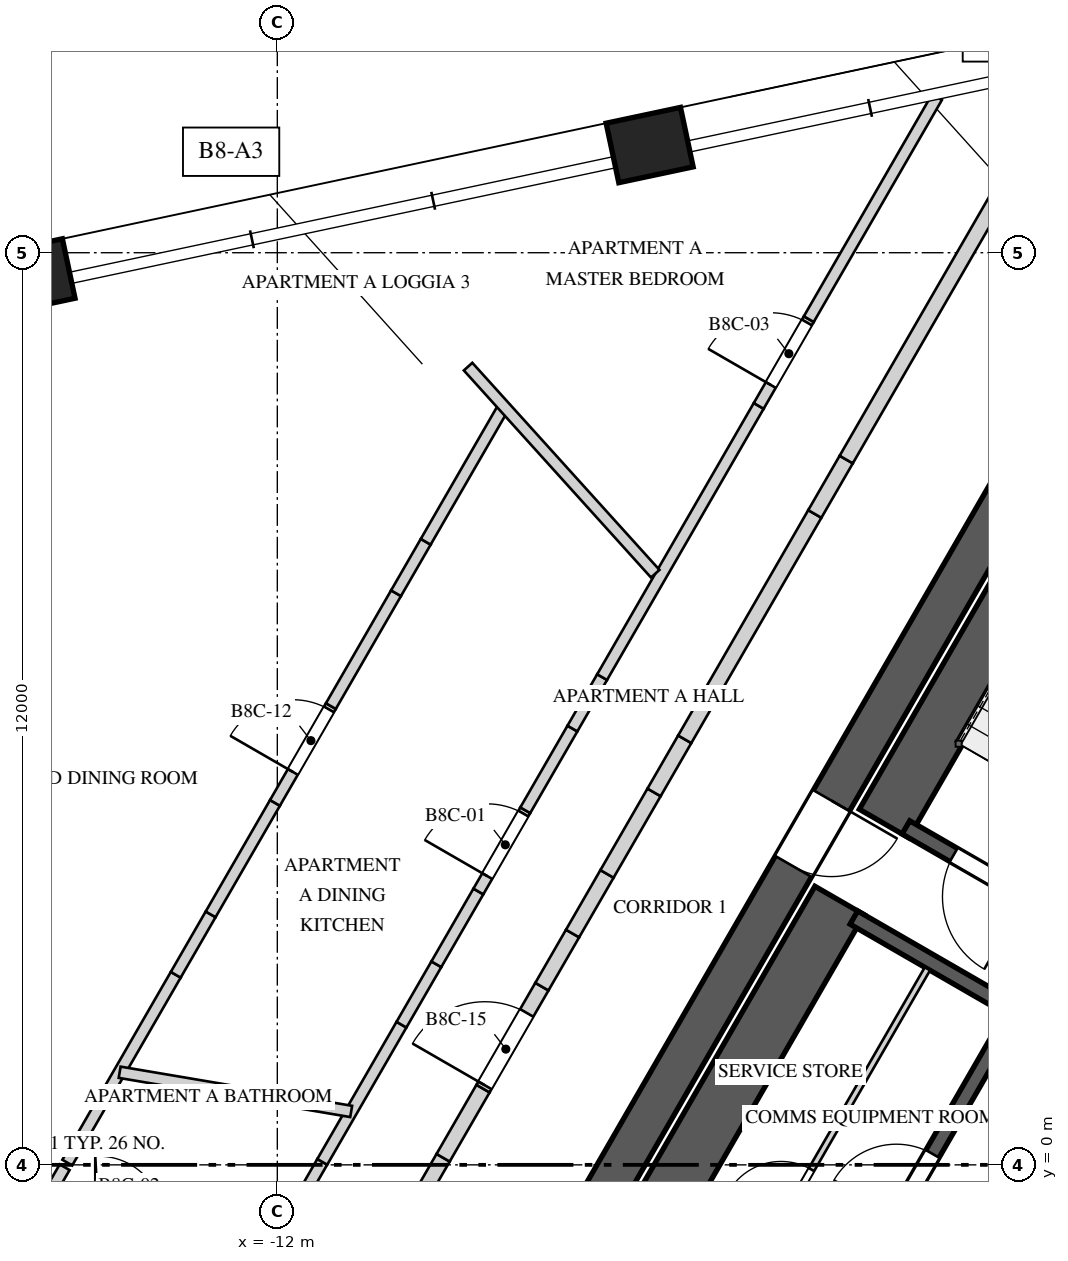
"""IFC4 building model, lengths in metres.
Left out: names, types, materials, properties, quantities, classifications, styles, units other than length and angle.
Written with IfcOpenShell. Run it as: python <this file> out.ifc"""

import sys

from ifc_helpers import new_model, si_unit, direction, frame, frame_2d, origin, origin_2d, place, context, subcontext, project, spatial, polyline, rectangle, outline, extrude, element, fill, save


model = new_model("IFC4")
c1 = context("Model", 3, precision=1e-05, world=origin(), true_north=direction((0.0, 1.0)))
c2 = subcontext(c1, "Body", "Model", "MODEL_VIEW")
j1 = project(units=[si_unit("LENGTHUNIT", "METRE"), si_unit("PLANEANGLEUNIT", "RADIAN")], contexts=[c1])
p1 = place(None, origin())
s1 = spatial("IfcSite", under=j1, at=p1, CompositionType="ELEMENT")
p2 = place(p1, origin())
s2 = spatial("IfcBuilding", under=s1, at=p2, CompositionType="ELEMENT")
p3 = place(p2, frame((0.0, 0.0, 348.4)))
s3 = spatial("IfcBuildingStorey", under=s2, at=p3, CompositionType="ELEMENT", Elevation=348.4)
p4 = place(p3, frame((-1.285, 10.725, 0.0), z_axis=(0.0, 0.0, 1.0), x_axis=(-0.499994590896, -0.86602852671, 0.0)))
e1 = element("IfcWall", 1, at=p4, inside=s3, PredefinedType="SHEAR", context=c2, shape_type="SweptSolid", body=[
    extrude(rectangle(XDim=17.292, YDim=0.55, at=frame_2d((8.646, 0.0))), origin(), (0.0, 0.0, 1.0), 4.0),
])
p5 = place(p4, frame((6.851, 0.0, 0.0)))
e2 = element("IfcOpeningElement", 2, at=p5, cuts=e1, PredefinedType="OPENING", context=c2, shape_type="SweptSolid", body=[
    extrude(rectangle(XDim=1.0, YDim=2.4, at=frame_2d((0.5, 1.2))), frame((0.0, 0.285, 0.0), z_axis=(0.0, -1.0, 0.0), x_axis=(1.0, 0.0, 0.0)), (0.0, 0.0, 1.0), 0.57),
])
p6 = place(p4, frame((15.089, 0.0, 0.0)))
e3 = element("IfcOpeningElement", 3, at=p6, cuts=e1, PredefinedType="OPENING", context=c2, shape_type="SweptSolid", body=[
    extrude(rectangle(XDim=0.8, YDim=2.1, at=frame_2d((0.4, 1.05))), frame((0.0, 0.285, 0.0), z_axis=(0.0, -1.0, 0.0), x_axis=(1.0, 0.0, 0.0)), (0.0, 0.0, 1.0), 0.57),
])
for number, where, z_axis, x_axis in (
    (4, (-7.102, 13.417, 0.0), (0.0, 0.0, 1.0), (-0.978, -0.208, 0.0)),
    (5, (-15.234, 11.688, 0.0), (0.0, 0.0, 1.0), (-0.978, -0.208, 0.0)),
):
    element("IfcColumn", number, at=place(p3, frame(where, z_axis=z_axis, x_axis=x_axis)), inside=s3, PredefinedType="COLUMN", context=c2, shape_type="SweptSolid", body=[
        extrude(rectangle(XDim=1.0, YDim=0.8, at=origin_2d()), origin(), (0.0, 0.0, 1.0), 4.0),
    ])
p7 = place(p3, frame((-0.918, 9.86, 0.0), z_axis=(0.0, 0.0, 1.0), x_axis=(-0.500026960575, -0.86600983753, 0.0)))
e6 = element("IfcWall", 6, at=p7, inside=s3, PredefinedType="SOLIDWALL", context=c2, shape_type="SweptSolid", body=[
    extrude(rectangle(XDim=6.2, YDim=0.75, at=frame_2d((3.1, 0.0))), origin(), (0.0, 0.0, 1.0), 3.65),
])
p8 = place(p3, frame((-1.521, 3.165, 0.0), z_axis=(0.0, 0.0, 1.0), x_axis=(-0.866030925526, 0.499990435942, 0.0)))
e7 = element("IfcWall", 7, at=p8, inside=s3, PredefinedType="SOLIDWALL", context=c2, shape_type="SweptSolid", body=[
    extrude(rectangle(XDim=2.55, YDim=0.2, at=frame_2d((1.275, 0.0))), origin(), (0.0, 0.0, 1.0), 3.65),
])
p9 = place(p8, frame((0.725, 0.0, 0.0)))
e8 = element("IfcOpeningElement", 8, at=p9, cuts=e7, PredefinedType="OPENING", context=c2, shape_type="SweptSolid", body=[
    extrude(rectangle(XDim=1.1, YDim=2.4, at=frame_2d((0.55, 1.2))), frame((0.0, 0.11, 0.0), z_axis=(0.0, -1.0, 0.0), x_axis=(1.0, 0.0, 0.0)), (0.0, 0.0, 1.0), 0.22),
])
p10 = place(p3, frame((-4.993, -2.648, 0.0), z_axis=(0.0, 0.0, 1.0), x_axis=(0.499996545922, 0.866027397988, 0.0)))
e9 = element("IfcWall", 9, at=p10, inside=s3, PredefinedType="SOLIDWALL", context=c2, shape_type="SweptSolid", body=[
    extrude(rectangle(XDim=5.5, YDim=0.2, at=frame_2d((2.75, 0.0))), origin(), (0.0, 0.0, 1.0), 3.65),
])
p11 = place(p10, frame((2.275, 0.0, 0.0)))
e10 = element("IfcOpeningElement", 10, at=p11, cuts=e9, PredefinedType="OPENING", context=c2, shape_type="SweptSolid", body=[
    extrude(rectangle(XDim=0.95, YDim=2.4, at=frame_2d((0.475, 1.2))), frame((0.0, 0.11, 0.0), z_axis=(0.0, -1.0, 0.0), x_axis=(1.0, 0.0, 0.0)), (0.0, 0.0, 1.0), 0.22),
])
p12 = place(p3, frame((-4.603, 3.477, 0.0), z_axis=(0.0, 0.0, 1.0), x_axis=(-0.500015767406, -0.866016300277, 0.0)))
e11 = element("IfcWall", 11, at=p12, inside=s3, PredefinedType="SOLIDWALL", context=c2, shape_type="SweptSolid", body=[
    extrude(rectangle(XDim=5.5, YDim=0.75, at=frame_2d((2.75, 0.0))), origin(), (0.0, 0.0, 1.0), 3.65),
])
p13 = place(p3, frame((-2.38, 2.078, 0.0), z_axis=(0.0, 0.0, 1.0), x_axis=(-0.866061024631, 0.499938297808, 0.0)))
e12 = element("IfcWall", 12, at=p13, inside=s3, PredefinedType="SOLIDWALL", context=c2, shape_type="SweptSolid", body=[
    extrude(rectangle(XDim=2.35, YDim=0.2, at=frame_2d((1.175, 0.0))), origin(), (0.0, 0.0, 1.0), 3.65),
])
p14 = place(p3, frame((-5.997, -1.838, 0.0), z_axis=(0.0, 0.0, 1.0), x_axis=(0.500005610874, 0.86602216432, 0.0)))
e13 = element("IfcWall", 13, at=p14, inside=s3, PredefinedType="PARTITIONING", context=c2, shape_type="SweptSolid", body=[
    extrude(rectangle(XDim=5.1, YDim=0.08, at=frame_2d((2.55, 0.0))), origin(), (0.0, 0.0, 1.0), 3.65),
])
p15 = place(p14, frame((1.25, 0.0, 0.0)))
e14 = element("IfcOpeningElement", 14, at=p15, cuts=e13, PredefinedType="OPENING", context=c2, shape_type="SweptSolid", body=[
    extrude(rectangle(XDim=0.8, YDim=2.1, at=frame_2d((0.4, 1.05))), frame((0.0, 0.05, 0.0), z_axis=(0.0, -1.0, 0.0), x_axis=(1.0, 0.0, 0.0)), (0.0, 0.0, 1.0), 0.1),
])
p16 = place(p3, frame((-15.145, -0.631, 0.0), z_axis=(0.0, 0.0, 1.0), x_axis=(0.499966449638, 0.866044773228, 0.0)))
e15 = element("IfcWall", 15, at=p16, inside=s3, PredefinedType="PARTITIONING", context=c2, shape_type="SweptSolid", body=[
    extrude(rectangle(XDim=0.693, YDim=0.15, at=frame_2d((0.346, 0.0))), origin(), (0.0, 0.0, 1.0), 2.95),
])
p17 = place(p3, frame((-14.763, 0.03, 0.0), z_axis=(0.0, 0.0, 1.0), x_axis=(0.500003887042, 0.866023159588, 0.0)))
e16 = element("IfcWall", 16, at=p17, inside=s3, PredefinedType="PARTITIONING", context=c2, shape_type="SweptSolid", body=[
    extrude(rectangle(XDim=2.854, YDim=0.15, at=frame_2d((1.427, 0.0))), origin(), (0.0, 0.0, 1.0), 3.65),
])
p18 = place(p3, frame((-13.336, 2.501, 0.0), z_axis=(0.0, 0.0, 1.0), x_axis=(0.500144624036, 0.865941888956, 0.0)))
e17 = element("IfcWall", 17, at=p18, inside=s3, PredefinedType="PARTITIONING", context=c2, shape_type="SweptSolid", body=[
    extrude(rectangle(XDim=0.918, YDim=0.15, at=frame_2d((0.459, 0.0))), origin(), (0.0, 0.0, 1.0), 2.55),
])
p19 = place(p3, frame((-12.877, 3.295, 0.0), z_axis=(0.0, 0.0, 1.0), x_axis=(0.499876388284, 0.86609675928, 0.0)))
e18 = element("IfcWall", 18, at=p19, inside=s3, PredefinedType="PARTITIONING", context=c2, shape_type="SweptSolid", body=[
    extrude(rectangle(XDim=1.693, YDim=0.15, at=frame_2d((0.847, 0.0))), origin(), (0.0, 0.0, 1.0), 3.65),
])
p20 = place(p3, frame((-12.031, 4.762, 0.0), z_axis=(0.0, 0.0, 1.0), x_axis=(0.50006736263, 0.865986508459, 0.0)))
e19 = element("IfcWall", 19, at=p20, inside=s3, PredefinedType="PARTITIONING", context=c2, shape_type="SweptSolid", body=[
    extrude(outline(polyline([(0.0, 0.0), (1.47, 0.0), (1.471, 3.65), (0.881, 3.65), (0.881, 2.55), (0.0, 2.55), (0.0, 0.0)])), frame((0.0, 0.075, 0.0), z_axis=(0.0, -1.0, 0.0), x_axis=(1.0, 0.0, 0.0)), (0.0, 0.0, 1.0), 0.15),
])
p21 = place(p20, frame((0.471, 0.0, 0.0)))
e20 = element("IfcOpeningElement", 20, at=p21, cuts=e19, PredefinedType="OPENING", context=c2, shape_type="SweptSolid", body=[
    extrude(rectangle(XDim=0.95, YDim=2.4, at=frame_2d((0.475, 1.2))), frame((0.0, 0.085, 0.0), z_axis=(0.0, -1.0, 0.0), x_axis=(1.0, 0.0, 0.0)), (0.0, 0.0, 1.0), 0.17),
])
p22 = place(p3, frame((-11.296, 6.035, 0.0), z_axis=(0.0, 0.0, 1.0), x_axis=(0.500059337743, 0.865991142412, 0.0)))
e21 = element("IfcWall", 21, at=p22, inside=s3, PredefinedType="PARTITIONING", context=c2, shape_type="SweptSolid", body=[
    extrude(rectangle(XDim=1.715, YDim=0.15, at=frame_2d((0.857, 0.0))), origin(), (0.0, 0.0, 1.0), 3.65),
])
p23 = place(p3, frame((-10.438, 7.52, 0.0), z_axis=(0.0, 0.0, 1.0), x_axis=(0.500001804394, 0.866024362014, 0.0)))
e22 = element("IfcWall", 22, at=p23, inside=s3, PredefinedType="PARTITIONING", context=c2, shape_type="SweptSolid", body=[
    extrude(rectangle(XDim=0.782, YDim=0.15, at=frame_2d((0.391, 0.0))), origin(), (0.0, 0.0, 1.0), 2.75),
])
p24 = place(p3, frame((-10.047, 8.197, 0.0), z_axis=(0.0, 0.0, 1.0), x_axis=(0.499972721762, 0.86604115231, 0.0)))
e23 = element("IfcWall", 23, at=p24, inside=s3, PredefinedType="PARTITIONING", context=c2, shape_type="SweptSolid", body=[
    extrude(rectangle(XDim=2.055, YDim=0.15, at=frame_2d((1.027, 0.0))), origin(), (0.0, 0.0, 1.0), 3.65),
])
p25 = place(p3, frame((-11.78, -0.603, 0.0), z_axis=(0.0, 0.0, 1.0), x_axis=(0.49999788721, 0.866026623601, 0.0)))
e24 = element("IfcWall", 24, at=p25, inside=s3, PredefinedType="PARTITIONING", context=c2, shape_type="SweptSolid", body=[
    extrude(rectangle(XDim=0.742, YDim=0.15, at=frame_2d((0.371, 0.0))), origin(), (0.0, 0.0, 1.0), 2.95),
])
p26 = place(p3, frame((-11.409, 0.039, 0.0), z_axis=(0.0, 0.0, 1.0), x_axis=(0.499969202016, 0.866043184279, 0.0)))
e25 = element("IfcWall", 25, at=p26, inside=s3, PredefinedType="PARTITIONING", context=c2, shape_type="SweptSolid", body=[
    extrude(rectangle(XDim=2.084, YDim=0.15, at=frame_2d((1.042, 0.0))), origin(), (0.0, 0.0, 1.0), 3.65),
])
p27 = place(p3, frame((-10.367, 1.844, 0.0), z_axis=(0.0, 0.0, 1.0), x_axis=(0.499945096919, 0.866057099772, 0.0)))
e26 = element("IfcWall", 26, at=p27, inside=s3, PredefinedType="PARTITIONING", context=c2, shape_type="SweptSolid", body=[
    extrude(rectangle(XDim=0.917, YDim=0.15, at=frame_2d((0.459, 0.0))), origin(), (0.0, 0.0, 1.0), 2.55),
])
p28 = place(p3, frame((-9.908, 2.639, 0.0), z_axis=(0.0, 0.0, 1.0), x_axis=(0.500009088543, 0.866020156448, 0.0)))
e27 = element("IfcWall", 27, at=p28, inside=s3, PredefinedType="PARTITIONING", context=c2, shape_type="SweptSolid", body=[
    extrude(rectangle(XDim=1.106, YDim=0.15, at=frame_2d((0.553, 0.0))), origin(), (0.0, 0.0, 1.0), 3.65),
])
p29 = place(p3, frame((-9.355, 3.597, 0.0), z_axis=(0.0, 0.0, 1.0), x_axis=(0.499990780478, 0.866030726613, 0.0)))
e28 = element("IfcWall", 28, at=p29, inside=s3, PredefinedType="PARTITIONING", context=c2, shape_type="SweptSolid", body=[
    extrude(outline(polyline([(0.0, 0.0), (1.234, 0.0), (1.234, 3.65), (0.881, 3.65), (0.881, 2.55), (0.0, 2.55), (0.0, 0.0)])), frame((0.0, 0.075, 0.0), z_axis=(0.0, -1.0, 0.0), x_axis=(1.0, 0.0, 0.0)), (0.0, 0.0, 1.0), 0.15),
])
p30 = place(p29, frame((0.234, 0.0, 0.0)))
e29 = element("IfcOpeningElement", 29, at=p30, cuts=e28, PredefinedType="OPENING", context=c2, shape_type="SweptSolid", body=[
    extrude(rectangle(XDim=0.95, YDim=2.4, at=frame_2d((0.475, 1.2))), frame((0.0, 0.085, 0.0), z_axis=(0.0, -1.0, 0.0), x_axis=(1.0, 0.0, 0.0)), (0.0, 0.0, 1.0), 0.17),
])
p31 = place(p3, frame((-8.738, 4.665, 0.0), z_axis=(0.0, 0.0, 1.0), x_axis=(0.500012022864, 0.866018462269, 0.0)))
e30 = element("IfcWall", 30, at=p31, inside=s3, PredefinedType="PARTITIONING", context=c2, shape_type="SweptSolid", body=[
    extrude(rectangle(XDim=1.241, YDim=0.15, at=frame_2d((0.62, 0.0))), origin(), (0.0, 0.0, 1.0), 3.65),
])
p32 = place(p3, frame((-8.118, 5.74, 0.0), z_axis=(0.0, 0.0, 1.0), x_axis=(0.500001804394, 0.866024362014, 0.0)))
e31 = element("IfcWall", 31, at=p32, inside=s3, PredefinedType="PARTITIONING", context=c2, shape_type="SweptSolid", body=[
    extrude(rectangle(XDim=0.782, YDim=0.15, at=frame_2d((0.391, 0.0))), origin(), (0.0, 0.0, 1.0), 2.75),
])
p33 = place(p3, frame((-7.727, 6.417, 0.0), z_axis=(0.0, 0.0, 1.0), x_axis=(0.50002680699, 0.866009926209, 0.0)))
e32 = element("IfcWall", 32, at=p33, inside=s3, PredefinedType="PARTITIONING", context=c2, shape_type="SweptSolid", body=[
    extrude(rectangle(XDim=4.12, YDim=0.15, at=frame_2d((2.06, 0.0))), origin(), (0.0, 0.0, 1.0), 3.65),
])
p34 = place(p3, frame((-5.667, 9.985, 0.0), z_axis=(0.0, 0.0, 1.0), x_axis=(0.499904166098, 0.866080726444, 0.0)))
e33 = element("IfcWall", 33, at=p34, inside=s3, PredefinedType="PARTITIONING", context=c2, shape_type="SweptSolid", body=[
    extrude(outline(polyline([(0.0, 0.0), (1.318, 0.0), (1.318, 3.65), (0.797, 3.65), (0.797, 2.95), (0.0, 2.95), (0.0, 0.0)])), frame((0.0, 0.075, 0.0), z_axis=(0.0, -1.0, 0.0), x_axis=(1.0, 0.0, 0.0)), (0.0, 0.0, 1.0), 0.15),
])
p35 = place(p34, frame((0.318, 0.0, 0.0)))
e34 = element("IfcOpeningElement", 34, at=p35, cuts=e33, PredefinedType="OPENING", context=c2, shape_type="SweptSolid", body=[
    extrude(rectangle(XDim=0.95, YDim=2.4, at=frame_2d((0.475, 1.2))), frame((0.0, 0.085, 0.0), z_axis=(0.0, -1.0, 0.0), x_axis=(1.0, 0.0, 0.0)), (0.0, 0.0, 1.0), 0.17),
])
p36 = place(p3, frame((-5.008, 11.126, 0.0), z_axis=(0.0, 0.0, 1.0), x_axis=(0.499994068514, 0.866028828302, 0.0)))
e35 = element("IfcWall", 35, at=p36, inside=s3, PredefinedType="PARTITIONING", context=c2, shape_type="SweptSolid", body=[
    extrude(rectangle(XDim=3.372, YDim=0.15, at=frame_2d((1.686, 0.0))), origin(), (0.0, 0.0, 1.0), 3.65),
])
p37 = place(p3, frame((-11.028, 0.703, 0.0), z_axis=(0.0, 0.0, 1.0), x_axis=(-0.985959074205, 0.166987137207, 0.0)))
e36 = element("IfcWall", 36, at=p37, inside=s3, PredefinedType="PARTITIONING", context=c2, shape_type="SweptSolid", body=[
    extrude(rectangle(XDim=3.089, YDim=0.15, at=frame_2d((1.545, 0.0))), origin(), (0.0, 0.0, 1.0), 3.65),
])
p38 = place(p3, frame((-9.49, 10.502, 0.0), z_axis=(0.0, 0.0, 1.0), x_axis=(0.670469300735, -0.741937272801, 0.0)))
e37 = element("IfcWall", 37, at=p38, inside=s3, PredefinedType="PARTITIONING", context=c2, shape_type="SweptSolid", body=[
    extrude(rectangle(XDim=3.672, YDim=0.15, at=frame_2d((1.836, 0.0))), origin(), (0.0, 0.0, 1.0), 3.65),
])
p39 = place(p3, frame((-10.229, -0.617, 0.0), z_axis=(0.0, 0.0, 1.0), x_axis=(0.5001686003, 0.865928040471, 0.0)))
e38 = element("IfcWall", 38, at=p39, inside=s3, PredefinedType="SOLIDWALL", context=c2, shape_type="SweptSolid", body=[
    extrude(rectangle(XDim=0.821, YDim=0.2, at=frame_2d((0.411, 0.0))), origin(), (0.0, 0.0, 1.0), 2.95),
])
p40 = place(p3, frame((-9.819, 0.094, 0.0), z_axis=(0.0, 0.0, 1.0), x_axis=(0.499890179513, 0.866088799389, 0.0)))
e39 = element("IfcWall", 39, at=p40, inside=s3, PredefinedType="SOLIDWALL", context=c2, shape_type="SweptSolid", body=[
    extrude(rectangle(XDim=1.05, YDim=0.2, at=frame_2d((0.525, 0.0))), origin(), (0.0, 0.0, 1.0), 3.65),
])
p41 = place(p3, frame((-9.294, 1.003, 0.0), z_axis=(0.0, 0.0, 1.0), x_axis=(0.500054401891, 0.86599399256, 0.0)))
e40 = element("IfcWall", 40, at=p41, inside=s3, PredefinedType="SOLIDWALL", context=c2, shape_type="SweptSolid", body=[
    extrude(outline(polyline([(0.0, 0.0), (1.549, 0.0), (1.549, 2.55), (0.605, 2.55), (0.605, 3.65), (0.0, 3.65), (0.0, 0.0)])), frame((0.0, 0.1, 0.0), z_axis=(0.0, -1.0, 0.0), x_axis=(1.0, 0.0, 0.0)), (0.0, 0.0, 1.0), 0.2),
])
p42 = place(p41, frame((0.05, 0.0, 0.0)))
e41 = element("IfcOpeningElement", 41, at=p42, cuts=e40, PredefinedType="OPENING", context=c2, shape_type="SweptSolid", body=[
    extrude(rectangle(XDim=1.1, YDim=2.4, at=frame_2d((0.55, 1.2))), frame((0.0, 0.11, 0.0), z_axis=(0.0, -1.0, 0.0), x_axis=(1.0, 0.0, 0.0)), (0.0, 0.0, 1.0), 0.22),
])
p43 = place(p3, frame((-8.519, 2.344, 0.0), z_axis=(0.0, 0.0, 1.0), x_axis=(0.499914554297, 0.866074730264, 0.0)))
e42 = element("IfcWall", 42, at=p43, inside=s3, PredefinedType="SOLIDWALL", context=c2, shape_type="SweptSolid", body=[
    extrude(rectangle(XDim=0.807, YDim=0.2, at=frame_2d((0.403, 0.0))), origin(), (0.0, 0.0, 1.0), 3.65),
])
p44 = place(p3, frame((-8.116, 3.043, 0.0), z_axis=(0.0, 0.0, 1.0), x_axis=(0.499994660107, 0.866028486751, 0.0)))
e43 = element("IfcWall", 43, at=p44, inside=s3, PredefinedType="SOLIDWALL", context=c2, shape_type="SweptSolid", body=[
    extrude(rectangle(XDim=0.906, YDim=0.2, at=frame_2d((0.453, 0.0))), origin(), (0.0, 0.0, 1.0), 2.55),
])
p45 = place(p3, frame((-7.663, 3.828, 0.0), z_axis=(0.0, 0.0, 1.0), x_axis=(0.499955681623, 0.866050989499, 0.0)))
e44 = element("IfcWall", 44, at=p45, inside=s3, PredefinedType="SOLIDWALL", context=c2, shape_type="SweptSolid", body=[
    extrude(rectangle(XDim=1.238, YDim=0.2, at=frame_2d((0.619, 0.0))), origin(), (0.0, 0.0, 1.0), 3.65),
])
p46 = place(p3, frame((-7.044, 4.9, 0.0), z_axis=(0.0, 0.0, 1.0), x_axis=(0.500141487433, 0.865943700565, 0.0)))
e45 = element("IfcWall", 45, at=p46, inside=s3, PredefinedType="SOLIDWALL", context=c2, shape_type="SweptSolid", body=[
    extrude(rectangle(XDim=0.807, YDim=0.2, at=frame_2d((0.403, 0.0))), origin(), (0.0, 0.0, 1.0), 2.75),
])
p47 = place(p3, frame((-6.64, 5.599, 0.0), z_axis=(0.0, 0.0, 1.0), x_axis=(0.499989998285, 0.8660311782, 0.0)))
e46 = element("IfcWall", 46, at=p47, inside=s3, PredefinedType="SOLIDWALL", context=c2, shape_type="SweptSolid", body=[
    extrude(rectangle(XDim=3.423, YDim=0.2, at=frame_2d((1.711, 0.0))), origin(), (0.0, 0.0, 1.0), 3.65),
])
p48 = place(p3, frame((-4.929, 8.563, 0.0), z_axis=(0.0, 0.0, 1.0), x_axis=(0.500046299512, 0.865998671098, 0.0)))
e47 = element("IfcWall", 47, at=p48, inside=s3, PredefinedType="SOLIDWALL", context=c2, shape_type="SweptSolid", body=[
    extrude(rectangle(XDim=0.827, YDim=0.2, at=frame_2d((0.413, 0.0))), origin(), (0.0, 0.0, 1.0), 2.95),
])
p49 = place(p3, frame((-4.515, 9.279, 0.0), z_axis=(0.0, 0.0, 1.0), x_axis=(0.499975428181, 0.866039589866, 0.0)))
e48 = element("IfcWall", 48, at=p49, inside=s3, PredefinedType="SOLIDWALL", context=c2, shape_type="SweptSolid", body=[
    extrude(rectangle(XDim=4.066, YDim=0.2, at=frame_2d((2.033, 0.0))), origin(), (0.0, 0.0, 1.0), 3.65),
])
p50 = place(p9, origin())
e49 = element("IfcDoor", 49, at=p50, inside=s3, OperationType="SINGLE_SWING_RIGHT", PredefinedType="DOOR", context=c2, shape_type="SweptSolid", body=[
    extrude(rectangle(XDim=1.1, YDim=2.4, at=frame_2d((0.55, 1.2))), frame((0.0, 0.025, 0.0), z_axis=(0.0, -1.0, 0.0), x_axis=(1.0, 0.0, 0.0)), (0.0, 0.0, 1.0), 0.05),
])
fill(e8, e49)
p51 = place(p11, origin())
e50 = element("IfcDoor", 50, at=p51, inside=s3, OperationType="SINGLE_SWING_LEFT", PredefinedType="DOOR", context=c2, shape_type="SweptSolid", body=[
    extrude(rectangle(XDim=0.95, YDim=2.4, at=frame_2d((0.475, 1.2))), frame((0.0, 0.025, 0.0), z_axis=(0.0, -1.0, 0.0), x_axis=(1.0, 0.0, 0.0)), (0.0, 0.0, 1.0), 0.05),
])
fill(e10, e50)
p52 = place(p15, origin())
e51 = element("IfcDoor", 51, at=p52, inside=s3, OperationType="SINGLE_SWING_RIGHT", PredefinedType="DOOR", context=c2, shape_type="SweptSolid", body=[
    extrude(rectangle(XDim=0.8, YDim=2.1, at=frame_2d((0.4, 1.05))), frame((0.0, 0.025, 0.0), z_axis=(0.0, -1.0, 0.0), x_axis=(1.0, 0.0, 0.0)), (0.0, 0.0, 1.0), 0.05),
])
fill(e14, e51)
p53 = place(p5, origin())
e52 = element("IfcDoor", 52, at=p53, inside=s3, OperationType="SINGLE_SWING_RIGHT", PredefinedType="DOOR", context=c2, shape_type="SweptSolid", body=[
    extrude(rectangle(XDim=1.0, YDim=2.4, at=frame_2d((0.5, 1.2))), frame((0.0, 0.025, 0.0), z_axis=(0.0, -1.0, 0.0), x_axis=(1.0, 0.0, 0.0)), (0.0, 0.0, 1.0), 0.05),
])
fill(e2, e52)
p54 = place(p30, origin())
e53 = element("IfcDoor", 53, at=p54, inside=s3, OperationType="SINGLE_SWING_LEFT", PredefinedType="DOOR", context=c2, shape_type="SweptSolid", body=[
    extrude(rectangle(XDim=0.95, YDim=2.4, at=frame_2d((0.475, 1.2))), frame((0.0, 0.025, 0.0), z_axis=(0.0, -1.0, 0.0), x_axis=(1.0, 0.0, 0.0)), (0.0, 0.0, 1.0), 0.05),
])
fill(e29, e53)
p55 = place(p35, origin())
e54 = element("IfcDoor", 54, at=p55, inside=s3, OperationType="SINGLE_SWING_LEFT", PredefinedType="DOOR", context=c2, shape_type="SweptSolid", body=[
    extrude(rectangle(XDim=0.95, YDim=2.4, at=frame_2d((0.475, 1.2))), frame((0.0, 0.025, 0.0), z_axis=(0.0, -1.0, 0.0), x_axis=(1.0, 0.0, 0.0)), (0.0, 0.0, 1.0), 0.05),
])
fill(e34, e54)
p56 = place(p21, origin())
e55 = element("IfcDoor", 55, at=p56, inside=s3, OperationType="SINGLE_SWING_RIGHT", PredefinedType="DOOR", context=c2, shape_type="SweptSolid", body=[
    extrude(rectangle(XDim=0.95, YDim=2.4, at=frame_2d((0.475, 1.2))), frame((0.0, 0.025, 0.0), z_axis=(0.0, -1.0, 0.0), x_axis=(1.0, 0.0, 0.0)), (0.0, 0.0, 1.0), 0.05),
])
fill(e20, e55)
p57 = place(p42, origin())
e56 = element("IfcDoor", 56, at=p57, inside=s3, OperationType="SINGLE_SWING_LEFT", PredefinedType="DOOR", context=c2, shape_type="SweptSolid", body=[
    extrude(rectangle(XDim=1.1, YDim=2.4, at=frame_2d((0.55, 1.2))), frame((0.0, 0.025, 0.0), z_axis=(0.0, -1.0, 0.0), x_axis=(1.0, 0.0, 0.0)), (0.0, 0.0, 1.0), 0.05),
])
fill(e41, e56)
save(model, sys.argv[1])
